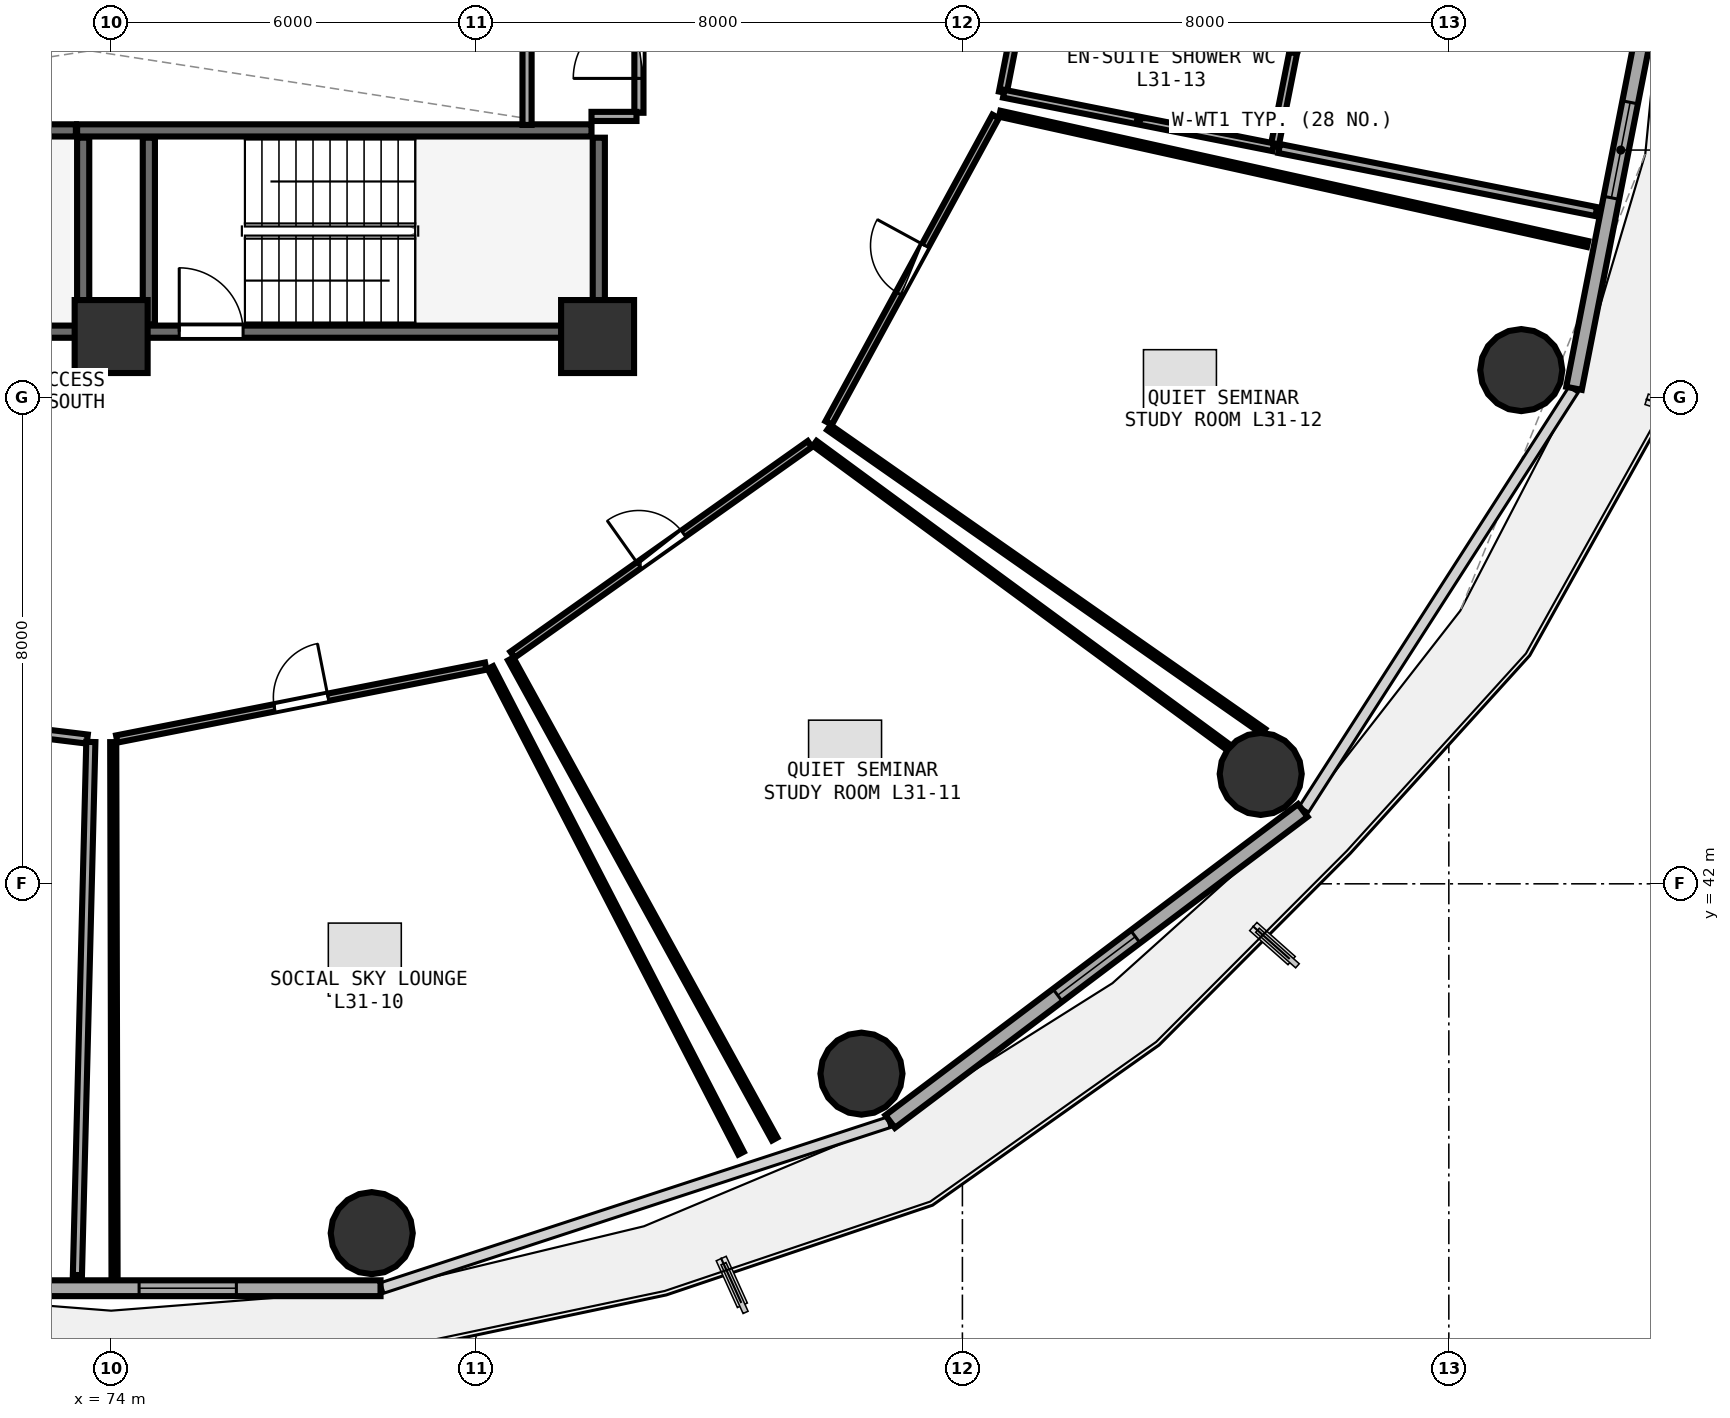
"""IFC4 building model, lengths in metres.
Left out: names, types, materials, properties, quantities, classifications, styles, units other than length and angle.
Written with IfcOpenShell. Run it as: python <this file> out.ifc"""

import sys

from ifc_helpers import new_model, si_unit, direction, frame, frame_2d, origin, origin_2d, place, context, subcontext, project, spatial, rectangle, circle, extrude, element, fill, save


model = new_model("IFC4")
c1 = context("Model", 3, precision=1e-05, world=origin(), true_north=direction((0.0, 1.0)))
c2 = subcontext(c1, "Body", "Model", "MODEL_VIEW")
j1 = project(units=[si_unit("LENGTHUNIT", "METRE"), si_unit("PLANEANGLEUNIT", "RADIAN")], contexts=[c1])
p1 = place(None, origin())
s1 = spatial("IfcSite", under=j1, at=p1, CompositionType="ELEMENT")
p2 = place(p1, origin())
s2 = spatial("IfcBuilding", under=s1, at=p2, CompositionType="ELEMENT")
p3 = place(p2, frame((0.0, 0.0, 121.35)))
s3 = spatial("IfcBuildingStorey", under=s2, at=p3, CompositionType="ELEMENT", Elevation=121.35)
for number, where, z_axis, x_axis in (
    (1, (74.0, 51.0, 0.0), (0.0, 0.0, 1.0), (1.0, 0.0, 0.0)),
    (2, (82.0, 51.0, 0.0), (0.0, 0.0, 1.0), (1.0, 0.0, 0.0)),
):
    element("IfcColumn", number, at=place(p3, frame(where, z_axis=z_axis, x_axis=x_axis)), inside=s3, PredefinedType="PILASTER", context=c2, shape_type="SweptSolid", body=[
        extrude(rectangle(XDim=1.2, YDim=1.2, at=origin_2d()), origin(), (0.0, 0.0, 1.0), 3.75),
    ])
for number, where, z_axis, x_axis in (
    (3, (78.286, 36.255, 0.0), (0.0, 0.0, 1.0), (1.0, 0.0, 0.0)),
    (4, (86.34, 38.878, 0.0), (0.0, 0.0, 1.0), (1.0, 0.0, 0.0)),
    (5, (92.906, 43.807, 0.0), (0.0, 0.0, 1.0), (1.0, 0.0, 0.0)),
    (6, (97.192, 50.448, 0.0), (0.0, 0.0, 1.0), (1.0, 0.0, 0.0)),
):
    element("IfcColumn", number, at=place(p3, frame(where, z_axis=z_axis, x_axis=x_axis)), inside=s3, PredefinedType="COLUMN", context=c2, shape_type="SweptSolid", body=[
        extrude(circle(Radius=0.675, at=origin_2d()), origin(), (0.0, 0.0, 1.0), 3.75),
    ])
p4 = place(p3, frame((69.57, 35.349, 0.0), z_axis=(0.0, 0.0, 1.0), x_axis=(1.0, 0.0, 0.0)))
e7 = element("IfcWall", 7, at=p4, inside=s3, PredefinedType="SOLIDWALL", context=c2, shape_type="SweptSolid", body=[
    extrude(rectangle(XDim=8.861, YDim=0.26, at=frame_2d((4.43, 0.0))), origin(), (0.0, 0.0, 1.0), 3.475),
])
p5 = place(p4, frame((4.89, 0.0, 0.85)))
e8 = element("IfcOpeningElement", 8, at=p5, cuts=e7, PredefinedType="OPENING", context=c2, shape_type="SweptSolid", body=[
    extrude(rectangle(XDim=1.6, YDim=1.45, at=frame_2d((0.8, 0.725))), frame((0.0, 0.14, 0.0), z_axis=(0.0, -1.0, 0.0), x_axis=(1.0, 0.0, 0.0)), (0.0, 0.0, 1.0), 0.28),
])
p6 = place(p3, frame((86.812, 38.09, 0.0), z_axis=(0.0, 0.0, 1.0), x_axis=(0.798501507879, 0.601992808857, 0.0)))
e9 = element("IfcWall", 9, at=p6, inside=s3, PredefinedType="SOLIDWALL", context=c2, shape_type="SweptSolid", body=[
    extrude(rectangle(XDim=8.499, YDim=0.26, at=frame_2d((4.25, 0.0))), origin(), (0.0, 0.0, 1.0), 3.475),
])
p7 = place(p6, frame((3.45, 0.0, 0.85)))
e10 = element("IfcOpeningElement", 10, at=p7, cuts=e9, PredefinedType="OPENING", context=c2, shape_type="SweptSolid", body=[
    extrude(rectangle(XDim=1.6, YDim=1.45, at=frame_2d((0.8, 0.725))), frame((0.0, 0.14, 0.0), z_axis=(0.0, -1.0, 0.0), x_axis=(1.0, 0.0, 0.0)), (0.0, 0.0, 1.0), 0.28),
])
p8 = place(p3, frame((98.059, 50.148, 0.0), z_axis=(0.0, 0.0, 1.0), x_axis=(0.192581843632, 0.981280914674, 0.0)))
e11 = element("IfcWall", 11, at=p8, inside=s3, PredefinedType="SOLIDWALL", context=c2, shape_type="SweptSolid", body=[
    extrude(rectangle(XDim=7.987, YDim=0.26, at=frame_2d((3.993, 0.0))), origin(), (0.0, 0.0, 1.0), 3.475),
])
p9 = place(p8, frame((3.193, 0.0, 0.85)))
e12 = element("IfcOpeningElement", 12, at=p9, cuts=e11, PredefinedType="OPENING", context=c2, shape_type="SweptSolid", body=[
    extrude(rectangle(XDim=1.6, YDim=1.45, at=frame_2d((0.8, 0.725))), frame((0.0, 0.14, 0.0), z_axis=(0.0, -1.0, 0.0), x_axis=(1.0, 0.0, 0.0)), (0.0, 0.0, 1.0), 0.28),
])
p10 = place(p3, frame((74.0, 51.08, 0.0), z_axis=(0.0, 0.0, 1.0), x_axis=(1.0, 0.0, 0.0)))
e13 = element("IfcWall", 13, at=p10, inside=s3, PredefinedType="SHEAR", context=c2, shape_type="SweptSolid", body=[
    extrude(rectangle(XDim=7.9, YDim=0.2, at=frame_2d((3.95, 0.0))), origin(), (0.0, 0.0, 1.0), 3.49),
])
p11 = place(p10, frame((1.12, 0.0, 0.0)))
e14 = element("IfcOpeningElement", 14, at=p11, cuts=e13, PredefinedType="OPENING", context=c2, shape_type="SweptSolid", body=[
    extrude(rectangle(XDim=1.05, YDim=2.1, at=frame_2d((0.525, 1.05))), frame((0.0, 0.11, 0.0), z_axis=(0.0, -1.0, 0.0), x_axis=(1.0, 0.0, 0.0)), (0.0, 0.0, 1.0), 0.22),
])
p12 = place(p3, frame((82.02, 51.2, 0.0), z_axis=(0.0, 0.0, 1.0), x_axis=(0.0, 1.0, 0.0)))
e15 = element("IfcWall", 15, at=p12, inside=s3, PredefinedType="SHEAR", context=c2, shape_type="SweptSolid", body=[
    extrude(rectangle(XDim=3.07, YDim=0.2, at=frame_2d((1.535, 0.0))), origin(), (0.0, 0.0, 1.0), 3.49),
])
p13 = place(p3, frame((81.9, 54.39, 0.0), z_axis=(0.0, 0.0, 1.0), x_axis=(-1.0, 0.0, 0.0)))
e16 = element("IfcWall", 16, at=p13, inside=s3, PredefinedType="SHEAR", context=c2, shape_type="SweptSolid", body=[
    extrude(rectangle(XDim=8.46, YDim=0.2, at=frame_2d((4.23, 0.0))), origin(), (0.0, 0.0, 1.0), 3.49),
])
p14 = place(p3, frame((74.62, 54.27, 0.0), z_axis=(0.0, 0.0, 1.0), x_axis=(0.0, -1.0, 0.0)))
e17 = element("IfcWall", 17, at=p14, inside=s3, PredefinedType="SHEAR", context=c2, shape_type="SweptSolid", body=[
    extrude(rectangle(XDim=3.07, YDim=0.2, at=frame_2d((1.535, 0.0))), origin(), (0.0, 0.0, 1.0), 3.49),
])
p15 = place(p3, frame((66.26, 51.08, 0.0), z_axis=(0.0, 0.0, 1.0), x_axis=(1.0, 0.0, 0.0)))
e18 = element("IfcWall", 18, at=p15, inside=s3, PredefinedType="SHEAR", context=c2, shape_type="SweptSolid", body=[
    extrude(rectangle(XDim=7.16, YDim=0.2, at=frame_2d((3.58, 0.0))), origin(), (0.0, 0.0, 1.0), 3.49),
])
p16 = place(p3, frame((73.54, 51.2, 0.0), z_axis=(0.0, 0.0, 1.0), x_axis=(0.0, 1.0, 0.0)))
e19 = element("IfcWall", 19, at=p16, inside=s3, PredefinedType="SHEAR", context=c2, shape_type="SweptSolid", body=[
    extrude(rectangle(XDim=3.07, YDim=0.2, at=frame_2d((1.535, 0.0))), origin(), (0.0, 0.0, 1.0), 3.49),
])
p17 = place(p3, frame((73.42, 54.39, 0.0), z_axis=(0.0, 0.0, 1.0), x_axis=(-1.0, 0.0, 0.0)))
e20 = element("IfcWall", 20, at=p17, inside=s3, PredefinedType="SHEAR", context=c2, shape_type="SweptSolid", body=[
    extrude(rectangle(XDim=7.16, YDim=0.2, at=frame_2d((3.58, 0.0))), origin(), (0.0, 0.0, 1.0), 3.49),
])
p18 = place(p3, frame((80.84, 54.48, 0.0), z_axis=(0.0, 0.0, 1.0), x_axis=(0.0, 1.0, 0.0)))
e21 = element("IfcWall", 21, at=p18, inside=s3, PredefinedType="PARTITIONING", context=c2, shape_type="SweptSolid", body=[
    extrude(rectangle(XDim=2.29, YDim=0.15, at=frame_2d((1.145, 0.0))), origin(), (0.0, 0.0, 1.0), 3.48),
])
p19 = place(p3, frame((82.68, 54.68, 0.0), z_axis=(0.0, 0.0, 1.0), x_axis=(0.0, 1.0, 0.0)))
e22 = element("IfcWall", 22, at=p19, inside=s3, PredefinedType="PARTITIONING", context=c2, shape_type="SweptSolid", body=[
    extrude(rectangle(XDim=2.21, YDim=0.15, at=frame_2d((1.105, 0.0))), origin(), (0.0, 0.0, 1.0), 3.48),
])
p20 = place(p19, frame((0.565, 0.0, 0.0)))
e23 = element("IfcOpeningElement", 23, at=p20, cuts=e22, PredefinedType="OPENING", context=c2, shape_type="SweptSolid", body=[
    extrude(rectangle(XDim=1.08, YDim=2.1, at=frame_2d((0.54, 1.05))), frame((0.0, 0.085, 0.0), z_axis=(0.0, -1.0, 0.0), x_axis=(1.0, 0.0, 0.0)), (0.0, 0.0, 1.0), 0.17),
])
p21 = place(p3, frame((70.414, 44.77, 0.0), z_axis=(0.0, 0.0, 1.0), x_axis=(0.992649213004, -0.12102702146, 0.0)))
e24 = element("IfcWall", 24, at=p21, inside=s3, PredefinedType="PARTITIONING", context=c2, shape_type="SweptSolid", body=[
    extrude(rectangle(XDim=3.218, YDim=0.15, at=frame_2d((1.609, 0.0))), origin(), (0.0, 0.0, 1.0), 3.48),
])
p22 = place(p21, frame((1.134, 0.0, 0.0)))
e25 = element("IfcOpeningElement", 25, at=p22, cuts=e24, PredefinedType="OPENING", context=c2, shape_type="SweptSolid", body=[
    extrude(rectangle(XDim=0.95, YDim=2.08, at=frame_2d((0.475, 1.04))), frame((0.0, 0.085, 0.0), z_axis=(0.0, -1.0, 0.0), x_axis=(1.0, 0.0, 0.0)), (0.0, 0.0, 1.0), 0.17),
])
p23 = place(p3, frame((74.093, 44.382, 0.0), z_axis=(0.0, 0.0, 1.0), x_axis=(0.981035031673, 0.193830510061, 0.0)))
e26 = element("IfcWall", 26, at=p23, inside=s3, PredefinedType="PARTITIONING", context=c2, shape_type="SweptSolid", body=[
    extrude(rectangle(XDim=6.184, YDim=0.12, at=frame_2d((3.092, 0.0))), origin(), (0.0, 0.0, 1.0), 3.235),
])
p24 = place(p23, frame((2.642, 0.0, 0.0)))
e27 = element("IfcOpeningElement", 27, at=p24, cuts=e26, PredefinedType="OPENING", context=c2, shape_type="SweptSolid", body=[
    extrude(rectangle(XDim=0.9, YDim=2.08, at=frame_2d((0.45, 1.04))), frame((0.0, 0.07, 0.0), z_axis=(0.0, -1.0, 0.0), x_axis=(1.0, 0.0, 0.0)), (0.0, 0.0, 1.0), 0.14),
])
p25 = place(p3, frame((80.601, 45.768, 0.0), z_axis=(0.0, 0.0, 1.0), x_axis=(0.815932399176, 0.578147316846, 0.0)))
e28 = element("IfcWall", 28, at=p25, inside=s3, PredefinedType="PARTITIONING", context=c2, shape_type="SweptSolid", body=[
    extrude(rectangle(XDim=5.993, YDim=0.12, at=frame_2d((2.997, 0.0))), origin(), (0.0, 0.0, 1.0), 2.925),
])
p26 = place(p25, frame((2.546, 0.0, 0.0)))
e29 = element("IfcOpeningElement", 29, at=p26, cuts=e28, PredefinedType="OPENING", context=c2, shape_type="SweptSolid", body=[
    extrude(rectangle(XDim=0.9, YDim=2.08, at=frame_2d((0.45, 1.04))), frame((0.0, 0.07, 0.0), z_axis=(0.0, -1.0, 0.0), x_axis=(1.0, 0.0, 0.0)), (0.0, 0.0, 1.0), 0.14),
])
p27 = place(p3, frame((85.801, 49.579, 0.0), z_axis=(0.0, 0.0, 1.0), x_axis=(0.478256103777, 0.878220416069, 0.0)))
e30 = element("IfcWall", 30, at=p27, inside=s3, PredefinedType="PARTITIONING", context=c2, shape_type="SweptSolid", body=[
    extrude(rectangle(XDim=5.741, YDim=0.12, at=frame_2d((2.871, 0.0))), origin(), (0.0, 0.0, 1.0), 2.925),
])
p28 = place(p27, frame((2.42, 0.0, 0.0)))
e31 = element("IfcOpeningElement", 31, at=p28, cuts=e30, PredefinedType="OPENING", context=c2, shape_type="SweptSolid", body=[
    extrude(rectangle(XDim=0.9, YDim=2.08, at=frame_2d((0.45, 1.04))), frame((0.0, 0.07, 0.0), z_axis=(0.0, -1.0, 0.0), x_axis=(1.0, 0.0, 0.0)), (0.0, 0.0, 1.0), 0.14),
])
p29 = place(p3, frame((81.9, 54.62, 0.0), z_axis=(0.0, 0.0, 1.0), x_axis=(1.0, 0.0, 0.0)))
e32 = element("IfcWall", 32, at=p29, inside=s3, PredefinedType="PARTITIONING", context=c2, shape_type="SweptSolid", body=[
    extrude(rectangle(XDim=0.74, YDim=0.15, at=frame_2d((0.37, 0.0))), origin(), (0.0, 0.0, 1.0), 2.775),
])
p30 = place(p3, frame((73.666, 44.333, 0.0), z_axis=(0.0, 0.0, 1.0), x_axis=(-0.025193894125, -0.999682583473, 0.0)))
e33 = element("IfcWall", 33, at=p30, inside=s3, PredefinedType="PARTITIONING", context=c2, shape_type="SweptSolid", body=[
    extrude(rectangle(XDim=8.77, YDim=0.15, at=frame_2d((4.385, 0.0))), origin(), (0.0, 0.0, 1.0), 2.975),
])
p31 = place(p3, frame((80.237, 45.556, 0.0), z_axis=(0.0, 0.0, 1.0), x_axis=(0.458694817529, -0.888593869196, 0.0)))
e34 = element("IfcWall", 34, at=p31, inside=s3, PredefinedType="PARTITIONING", context=c2, shape_type="SweptSolid", body=[
    extrude(rectangle(XDim=8.987, YDim=0.1, at=frame_2d((4.494, 0.0))), origin(), (0.0, 0.0, 1.0), 2.925),
])
p32 = place(p3, frame((74.056, 35.56, 0.0), z_axis=(0.0, 0.0, 1.0), x_axis=(-0.00247758273, 0.999996930787, 0.0)))
e35 = element("IfcWall", 35, at=p32, inside=s3, PredefinedType="PARTITIONING", context=c2, shape_type="SweptSolid", body=[
    extrude(rectangle(XDim=8.77, YDim=0.1, at=frame_2d((4.385, 0.0))), origin(), (0.0, 0.0, 1.0), 2.975),
])
p33 = place(p3, frame((85.572, 49.243, 0.0), z_axis=(0.0, 0.0, 1.0), x_axis=(0.805852200235, -0.592116737963, 0.0)))
e36 = element("IfcWall", 36, at=p33, inside=s3, PredefinedType="PARTITIONING", context=c2, shape_type="SweptSolid", body=[
    extrude(rectangle(XDim=8.43, YDim=0.1, at=frame_2d((4.215, 0.0))), origin(), (0.0, 0.0, 1.0), 2.925),
])
p34 = place(p3, frame((84.913, 37.803, 0.0), z_axis=(0.0, 0.0, 1.0), x_axis=(-0.481837612944, 0.876260529039, 0.0)))
e37 = element("IfcWall", 37, at=p34, inside=s3, PredefinedType="PARTITIONING", context=c2, shape_type="SweptSolid", body=[
    extrude(rectangle(XDim=9.01, YDim=0.1, at=frame_2d((4.505, 0.0))), origin(), (0.0, 0.0, 1.0), 2.925),
])
p35 = place(p3, frame((88.614, 54.664, 0.0), z_axis=(0.0, 0.0, 1.0), x_axis=(0.976312199438, -0.216366562178, 0.0)))
e38 = element("IfcWall", 38, at=p35, inside=s3, PredefinedType="PARTITIONING", context=c2, shape_type="SweptSolid", body=[
    extrude(rectangle(XDim=9.903, YDim=0.1, at=frame_2d((4.951, 0.0))), origin(), (0.0, 0.0, 1.0), 2.975),
])
p36 = place(p3, frame((92.953, 44.506, 0.0), z_axis=(0.0, 0.0, 1.0), x_axis=(-0.8195552972, 0.573000100201, 0.0)))
e39 = element("IfcWall", 39, at=p36, inside=s3, PredefinedType="PARTITIONING", context=c2, shape_type="SweptSolid", body=[
    extrude(rectangle(XDim=8.722, YDim=0.1, at=frame_2d((4.361, 0.0))), origin(), (0.0, 0.0, 1.0), 3.175),
])
p37 = place(p3, frame((88.665, 55.017, 0.0), z_axis=(0.0, 0.0, 1.0), x_axis=(0.192633384292, 0.981270798127, 0.0)))
e40 = element("IfcWall", 40, at=p37, inside=s3, PredefinedType="PLUMBINGWALL", context=c2, shape_type="SweptSolid", body=[
    extrude(rectangle(XDim=1.2, YDim=0.13, at=frame_2d((0.6, 0.0))), origin(), (0.0, 0.0, 1.0), 3.48),
])
p38 = place(p3, frame((93.44, 55.667, 0.0), z_axis=(0.0, 0.0, 1.0), x_axis=(-0.194648564843, -0.980873047955, 0.0)))
e41 = element("IfcWall", 41, at=p38, inside=s3, PredefinedType="PLUMBINGWALL", context=c2, shape_type="SweptSolid", body=[
    extrude(rectangle(XDim=1.568, YDim=0.13, at=frame_2d((0.784, 0.0))), origin(), (0.0, 0.0, 1.0), 3.48),
])
p39 = place(p3, frame((93.111, 54.113, 0.0), z_axis=(0.0, 0.0, 1.0), x_axis=(-0.980825194025, 0.194889555304, 0.0)))
e42 = element("IfcWall", 42, at=p39, inside=s3, PredefinedType="PLUMBINGWALL", context=c2, shape_type="SweptSolid", body=[
    extrude(rectangle(XDim=4.517, YDim=0.13, at=frame_2d((2.259, 0.0))), origin(), (0.0, 0.0, 1.0), 3.175),
])
p40 = place(p3, frame((98.425, 53.055, 0.0), z_axis=(0.0, 0.0, 1.0), x_axis=(-0.980779700981, 0.195118369572, 0.0)))
e43 = element("IfcWall", 43, at=p40, inside=s3, PredefinedType="PARTITIONING", context=c2, shape_type="SweptSolid", body=[
    extrude(rectangle(XDim=5.318, YDim=0.15, at=frame_2d((2.659, 0.0))), origin(), (0.0, 0.0, 1.0), 2.975),
])
p41 = place(p5, origin())
e44 = element("IfcWindow", 44, at=p41, inside=s3, PartitioningType="SINGLE_PANEL", PredefinedType="WINDOW", context=c2, shape_type="SweptSolid", body=[
    extrude(rectangle(XDim=1.6, YDim=1.45, at=frame_2d((0.8, 0.725))), frame((0.0, 0.03, 0.0), z_axis=(0.0, -1.0, 0.0), x_axis=(1.0, 0.0, 0.0)), (0.0, 0.0, 1.0), 0.06),
])
fill(e8, e44)
p42 = place(p7, origin())
e45 = element("IfcWindow", 45, at=p42, inside=s3, PartitioningType="SINGLE_PANEL", PredefinedType="WINDOW", context=c2, shape_type="SweptSolid", body=[
    extrude(rectangle(XDim=1.6, YDim=1.45, at=frame_2d((0.8, 0.725))), frame((0.0, 0.03, 0.0), z_axis=(0.0, -1.0, 0.0), x_axis=(1.0, 0.0, 0.0)), (0.0, 0.0, 1.0), 0.06),
])
fill(e10, e45)
p43 = place(p9, origin())
e46 = element("IfcWindow", 46, at=p43, inside=s3, PartitioningType="SINGLE_PANEL", PredefinedType="WINDOW", context=c2, shape_type="SweptSolid", body=[
    extrude(rectangle(XDim=1.6, YDim=1.45, at=frame_2d((0.8, 0.725))), frame((0.0, 0.03, 0.0), z_axis=(0.0, -1.0, 0.0), x_axis=(1.0, 0.0, 0.0)), (0.0, 0.0, 1.0), 0.06),
])
fill(e12, e46)
p44 = place(p11, origin())
e47 = element("IfcDoor", 47, at=p44, inside=s3, OperationType="SINGLE_SWING_LEFT", PredefinedType="DOOR", context=c2, shape_type="SweptSolid", body=[
    extrude(rectangle(XDim=1.05, YDim=2.1, at=frame_2d((0.525, 1.05))), frame((0.0, 0.025, 0.0), z_axis=(0.0, -1.0, 0.0), x_axis=(1.0, 0.0, 0.0)), (0.0, 0.0, 1.0), 0.05),
])
fill(e14, e47)
p45 = place(p20, origin())
e48 = element("IfcDoor", 48, at=p45, inside=s3, OperationType="SINGLE_SWING_LEFT", PredefinedType="DOOR", context=c2, shape_type="SweptSolid", body=[
    extrude(rectangle(XDim=1.08, YDim=2.1, at=frame_2d((0.54, 1.05))), frame((0.0, 0.025, 0.0), z_axis=(0.0, -1.0, 0.0), x_axis=(1.0, 0.0, 0.0)), (0.0, 0.0, 1.0), 0.05),
])
fill(e23, e48)
p46 = place(p24, origin())
e49 = element("IfcDoor", 49, at=p46, inside=s3, OperationType="SINGLE_SWING_RIGHT", PredefinedType="DOOR", context=c2, shape_type="SweptSolid", body=[
    extrude(rectangle(XDim=0.9, YDim=2.08, at=frame_2d((0.45, 1.04))), frame((0.0, 0.025, 0.0), z_axis=(0.0, -1.0, 0.0), x_axis=(1.0, 0.0, 0.0)), (0.0, 0.0, 1.0), 0.05),
])
fill(e27, e49)
p47 = place(p26, origin())
e50 = element("IfcDoor", 50, at=p47, inside=s3, OperationType="SINGLE_SWING_LEFT", PredefinedType="DOOR", context=c2, shape_type="SweptSolid", body=[
    extrude(rectangle(XDim=0.9, YDim=2.08, at=frame_2d((0.45, 1.04))), frame((0.0, 0.025, 0.0), z_axis=(0.0, -1.0, 0.0), x_axis=(1.0, 0.0, 0.0)), (0.0, 0.0, 1.0), 0.05),
])
fill(e29, e50)
p48 = place(p28, origin())
e51 = element("IfcDoor", 51, at=p48, inside=s3, OperationType="SINGLE_SWING_RIGHT", PredefinedType="DOOR", context=c2, shape_type="SweptSolid", body=[
    extrude(rectangle(XDim=0.9, YDim=2.08, at=frame_2d((0.45, 1.04))), frame((0.0, 0.025, 0.0), z_axis=(0.0, -1.0, 0.0), x_axis=(1.0, 0.0, 0.0)), (0.0, 0.0, 1.0), 0.05),
])
fill(e31, e51)
save(model, sys.argv[1])
